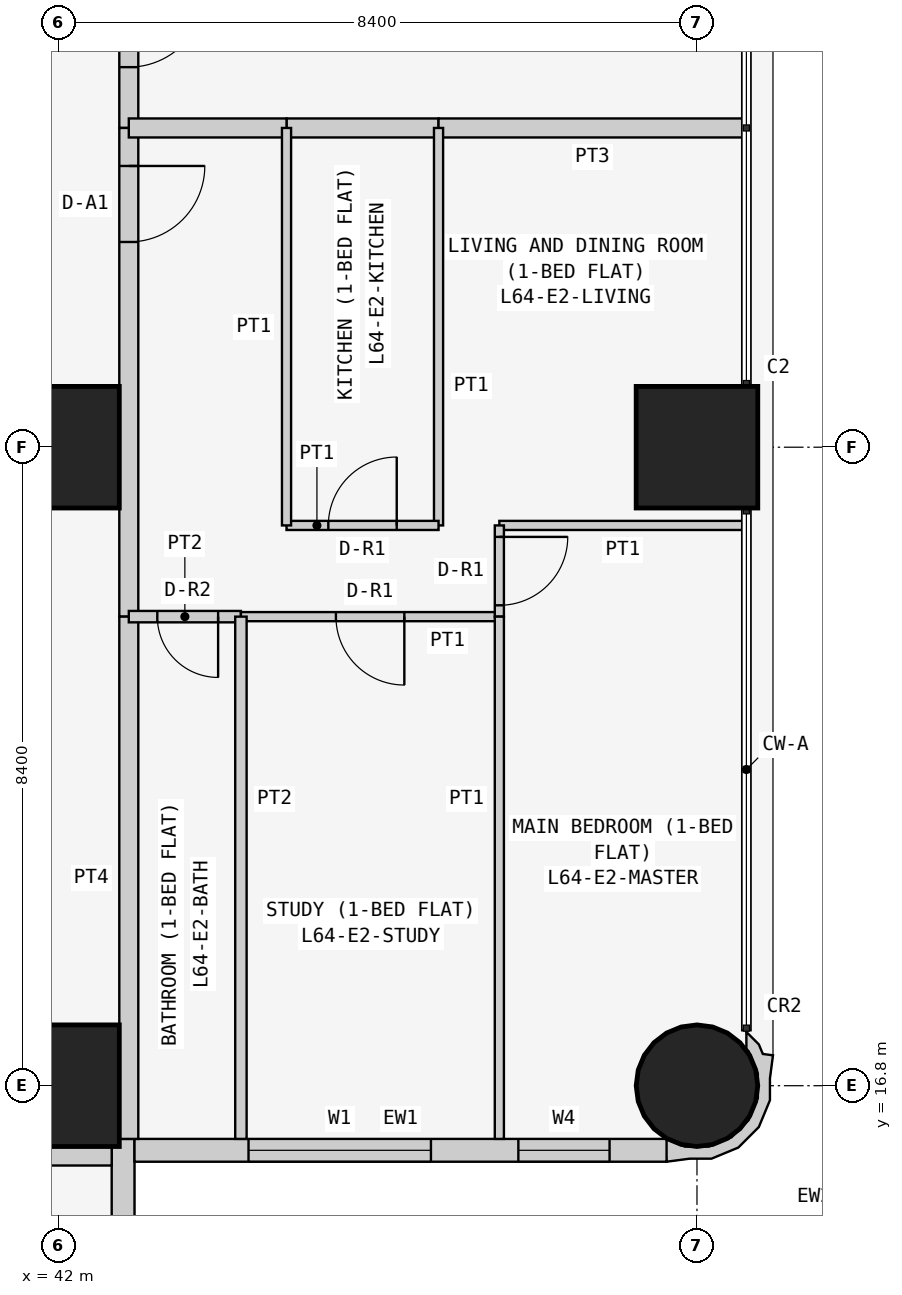
"""IFC4 building model, lengths in metres.
Left out: names, types, materials, properties, quantities, classifications, styles, units other than length and angle.
Written with IfcOpenShell. Run it as: python <this file> out.ifc"""

import sys

from ifc_helpers import new_model, si_unit, direction, frame, frame_2d, origin, origin_2d, place, context, subcontext, project, spatial, polyline, rectangle, circle, outline, extrude, element, fill, save


model = new_model("IFC4")
c1 = context("Model", 3, precision=1e-05, world=origin(), true_north=direction((0.0, 1.0)))
c2 = subcontext(c1, "Body", "Model", "MODEL_VIEW")
j1 = project(units=[si_unit("LENGTHUNIT", "METRE"), si_unit("PLANEANGLEUNIT", "RADIAN")], contexts=[c1])
p1 = place(None, origin())
s1 = spatial("IfcSite", under=j1, at=p1, CompositionType="ELEMENT")
p2 = place(p1, origin())
s2 = spatial("IfcBuilding", under=s1, at=p2, CompositionType="ELEMENT")
p3 = place(p2, frame((0.0, 0.0, 244.5)))
s3 = spatial("IfcBuildingStorey", under=s2, at=p3, CompositionType="ELEMENT", Elevation=244.5)
for number, where, z_axis, x_axis in (
    (1, (42.0, 16.8, 0.0), (0.0, 0.0, 1.0), (1.0, 0.0, 0.0)),
    (2, (42.0, 25.2, 0.0), (0.0, 0.0, 1.0), (1.0, 0.0, 0.0)),
):
    element("IfcColumn", number, at=place(p3, frame(where, z_axis=z_axis, x_axis=x_axis)), inside=s3, PredefinedType="COLUMN", context=c2, shape_type="SweptSolid", body=[
        extrude(rectangle(XDim=1.6, YDim=1.6, at=origin_2d()), origin(), (0.0, 0.0, 1.0), 3.6),
    ])
p4 = place(p3, frame((50.4, 16.8, 0.0), z_axis=(0.0, 0.0, 1.0), x_axis=(1.0, 0.0, 0.0)))
e3 = element("IfcColumn", 3, at=p4, inside=s3, PredefinedType="COLUMN", context=c2, shape_type="SweptSolid", body=[
    extrude(circle(Radius=0.8, at=origin_2d()), origin(), (0.0, 0.0, 1.0), 3.6),
])
p5 = place(p3, frame((50.4, 25.2, 0.0), z_axis=(0.0, 0.0, 1.0), x_axis=(1.0, 0.0, 0.0)))
e4 = element("IfcColumn", 4, at=p5, inside=s3, PredefinedType="COLUMN", context=c2, shape_type="SweptSolid", body=[
    extrude(rectangle(XDim=1.6, YDim=1.6, at=origin_2d()), origin(), (0.0, 0.0, 1.0), 3.6),
])
p6 = place(p3, frame((42.85, 8.8, 0.0), z_axis=(0.0, 0.0, 1.0), x_axis=(0.0, 1.0, 0.0)))
e5 = element("IfcWall", 5, at=p6, inside=s3, PredefinedType="SOLIDWALL", context=c2, shape_type="SweptSolid", body=[
    extrude(rectangle(XDim=7.3, YDim=0.3, at=frame_2d((3.65, 0.0))), origin(), (0.0, 0.0, 1.0), 3.35),
])
p7 = place(p6, frame((3.1, 0.0, 0.9)))
e6 = element("IfcOpeningElement", 6, at=p7, cuts=e5, PredefinedType="OPENING", context=c2, shape_type="SweptSolid", body=[
    extrude(rectangle(XDim=2.4, YDim=1.5, at=frame_2d((1.2, 0.75))), frame((0.0, 0.16, 0.0), z_axis=(0.0, -1.0, 0.0), x_axis=(1.0, 0.0, 0.0)), (0.0, 0.0, 1.0), 0.32),
])
p8 = place(p6, frame((0.75, 0.0, 0.9)))
e7 = element("IfcOpeningElement", 7, at=p8, cuts=e5, PredefinedType="OPENING", context=c2, shape_type="SweptSolid", body=[
    extrude(rectangle(XDim=1.2, YDim=1.5, at=frame_2d((0.6, 0.75))), frame((0.0, 0.16, 0.0), z_axis=(0.0, -1.0, 0.0), x_axis=(1.0, 0.0, 0.0)), (0.0, 0.0, 1.0), 0.32),
])
p9 = place(p3, frame((43.0, 15.95, 0.0), z_axis=(0.0, 0.0, 1.0), x_axis=(1.0, 0.0, 0.0)))
e8 = element("IfcWall", 8, at=p9, inside=s3, PredefinedType="SOLIDWALL", context=c2, shape_type="SweptSolid", body=[
    extrude(rectangle(XDim=7.0, YDim=0.3, at=frame_2d((3.5, 0.0))), origin(), (0.0, 0.0, 1.0), 3.35),
])
p10 = place(p9, frame((1.5, 0.0, 0.9)))
e9 = element("IfcOpeningElement", 9, at=p10, cuts=e8, PredefinedType="OPENING", context=c2, shape_type="SweptSolid", body=[
    extrude(rectangle(XDim=2.4, YDim=1.5, at=frame_2d((1.2, 0.75))), frame((0.0, 0.16, 0.0), z_axis=(0.0, -1.0, 0.0), x_axis=(1.0, 0.0, 0.0)), (0.0, 0.0, 1.0), 0.32),
])
p11 = place(p9, frame((5.05, 0.0, 0.9)))
e10 = element("IfcOpeningElement", 10, at=p11, cuts=e8, PredefinedType="OPENING", context=c2, shape_type="SweptSolid", body=[
    extrude(rectangle(XDim=1.2, YDim=1.5, at=frame_2d((0.6, 0.75))), frame((0.0, 0.16, 0.0), z_axis=(0.0, -1.0, 0.0), x_axis=(1.0, 0.0, 0.0)), (0.0, 0.0, 1.0), 0.32),
])
p12 = place(p3, frame((50.073, 15.983, 0.0), z_axis=(0.0, 0.0, 1.0), x_axis=(0.93923434088, -0.343276641956, 0.0)))
e11 = element("IfcWall", 11, at=p12, inside=s3, PredefinedType="SOLIDWALL", context=c2, shape_type="SweptSolid", body=[
    extrude(outline(polyline([(0.828, 1.598), (0.697, 1.569), (0.604, 1.67), (0.394, 1.767), (0.471, 1.556), (0.509, 1.539), (0.724, 1.304), (0.833, 1.005), (0.82, 0.686), (0.686, 0.397), (0.451, 0.182), (0.152, 0.073), (-0.116, 0.084), (-0.128, 0.078), (-0.146, 0.071), (-0.006, -0.197), (0.266, -0.055), (0.535, 0.044), (0.817, 0.302), (0.978, 0.648), (0.994, 1.03), (0.895, 1.3), (0.828, 1.598)])), origin(), (0.0, 0.0, 1.0), 3.35),
])
p13 = place(p3, frame((42.925, 32.0, 0.0), z_axis=(0.0, 0.0, 1.0), x_axis=(0.0, -1.0, 0.0)))
e12 = element("IfcWall", 12, at=p13, inside=s3, PredefinedType="PARTITIONING", context=c2, shape_type="SweptSolid", body=[
    extrude(rectangle(XDim=2.6, YDim=0.25, at=frame_2d((1.3, 0.0))), origin(), (0.0, 0.0, 1.0), 3.35),
])
p14 = place(p13, frame((0.8, 0.0, 0.0)))
e13 = element("IfcOpeningElement", 13, at=p14, cuts=e12, PredefinedType="OPENING", context=c2, shape_type="SweptSolid", body=[
    extrude(rectangle(XDim=1.0, YDim=2.1, at=frame_2d((0.5, 1.05))), frame((0.0, 0.135, 0.0), z_axis=(0.0, -1.0, 0.0), x_axis=(1.0, 0.0, 0.0)), (0.0, 0.0, 1.0), 0.27),
])
p15 = place(p3, frame((42.925, 29.4, 0.0), z_axis=(0.0, 0.0, 1.0), x_axis=(0.0, -1.0, 0.0)))
e14 = element("IfcWall", 14, at=p15, inside=s3, PredefinedType="PARTITIONING", context=c2, shape_type="SweptSolid", body=[
    extrude(rectangle(XDim=6.429, YDim=0.25, at=frame_2d((3.214, 0.0))), origin(), (0.0, 0.0, 1.0), 3.35),
])
p16 = place(p15, frame((0.5, 0.0, 0.0)))
e15 = element("IfcOpeningElement", 15, at=p16, cuts=e14, PredefinedType="OPENING", context=c2, shape_type="SweptSolid", body=[
    extrude(rectangle(XDim=1.0, YDim=2.1, at=frame_2d((0.5, 1.05))), frame((0.0, 0.135, 0.0), z_axis=(0.0, -1.0, 0.0), x_axis=(1.0, 0.0, 0.0)), (0.0, 0.0, 1.0), 0.27),
])
for number, where, z_axis, x_axis in (
    (16, (42.925, 22.971, 0.0), (0.0, 0.0, 1.0), (0.0, -1.0, 0.0)),
    (17, (42.7, 15.875, 0.0), (0.0, 0.0, 1.0), (-1.0, 0.0, 0.0)),
):
    element("IfcWall", number, at=place(p3, frame(where, z_axis=z_axis, x_axis=x_axis)), inside=s3, PredefinedType="PARTITIONING", context=c2, shape_type="SweptSolid", body=[
        extrude(rectangle(XDim=6.871, YDim=0.25, at=frame_2d((3.436, 0.0))), origin(), (0.0, 0.0, 1.0), 3.35),
    ])
p17 = place(p3, frame((47.0, 29.4, 0.0), z_axis=(0.0, 0.0, 1.0), x_axis=(-1.0, 0.0, 0.0)))
e18 = element("IfcWall", 18, at=p17, inside=s3, PredefinedType="PARTITIONING", context=c2, shape_type="SweptSolid", body=[
    extrude(rectangle(XDim=2.0, YDim=0.25, at=frame_2d((1.0, 0.0))), origin(), (0.0, 0.0, 1.0), 3.35),
])
p18 = place(p3, frame((45.0, 29.4, 0.0), z_axis=(0.0, 0.0, 1.0), x_axis=(-1.0, 0.0, 0.0)))
e19 = element("IfcWall", 19, at=p18, inside=s3, PredefinedType="PARTITIONING", context=c2, shape_type="SweptSolid", body=[
    extrude(rectangle(XDim=2.075, YDim=0.25, at=frame_2d((1.038, 0.0))), origin(), (0.0, 0.0, 1.0), 3.35),
])
p19 = place(p3, frame((51.05, 29.4, 0.0), z_axis=(0.0, 0.0, 1.0), x_axis=(-1.0, 0.0, 0.0)))
e20 = element("IfcWall", 20, at=p19, inside=s3, PredefinedType="PARTITIONING", context=c2, shape_type="SweptSolid", body=[
    extrude(rectangle(XDim=4.05, YDim=0.25, at=frame_2d((2.025, 0.0))), origin(), (0.0, 0.0, 1.0), 3.35),
])
p20 = place(p3, frame((47.0, 29.4, 0.0), z_axis=(0.0, 0.0, 1.0), x_axis=(0.0, -1.0, 0.0)))
e21 = element("IfcWall", 21, at=p20, inside=s3, PredefinedType="PARTITIONING", context=c2, shape_type="SweptSolid", body=[
    extrude(rectangle(XDim=5.229, YDim=0.12, at=frame_2d((2.615, 0.0))), origin(), (0.0, 0.0, 1.0), 3.35),
])
p21 = place(p3, frame((47.0, 24.171, 0.0), z_axis=(0.0, 0.0, 1.0), x_axis=(-1.0, 0.0, 0.0)))
e22 = element("IfcWall", 22, at=p21, inside=s3, PredefinedType="PARTITIONING", context=c2, shape_type="SweptSolid", body=[
    extrude(rectangle(XDim=2.0, YDim=0.12, at=frame_2d((1.0, 0.0))), origin(), (0.0, 0.0, 1.0), 3.35),
])
p22 = place(p21, frame((0.55, 0.0, 0.0)))
e23 = element("IfcOpeningElement", 23, at=p22, cuts=e22, PredefinedType="OPENING", context=c2, shape_type="SweptSolid", body=[
    extrude(rectangle(XDim=0.9, YDim=2.1, at=frame_2d((0.45, 1.05))), frame((0.0, 0.07, 0.0), z_axis=(0.0, -1.0, 0.0), x_axis=(1.0, 0.0, 0.0)), (0.0, 0.0, 1.0), 0.14),
])
p23 = place(p3, frame((45.0, 24.171, 0.0), z_axis=(0.0, 0.0, 1.0), x_axis=(0.0, 1.0, 0.0)))
e24 = element("IfcWall", 24, at=p23, inside=s3, PredefinedType="PARTITIONING", context=c2, shape_type="SweptSolid", body=[
    extrude(rectangle(XDim=5.229, YDim=0.12, at=frame_2d((2.615, 0.0))), origin(), (0.0, 0.0, 1.0), 3.35),
])
p24 = place(p3, frame((44.4, 22.971, 0.0), z_axis=(0.0, 0.0, 1.0), x_axis=(-1.0, 0.0, 0.0)))
e25 = element("IfcWall", 25, at=p24, inside=s3, PredefinedType="PARTITIONING", context=c2, shape_type="SweptSolid", body=[
    extrude(rectangle(XDim=1.475, YDim=0.15, at=frame_2d((0.737, 0.0))), origin(), (0.0, 0.0, 1.0), 3.35),
])
p25 = place(p24, frame((0.3, 0.0, 0.0)))
e26 = element("IfcOpeningElement", 26, at=p25, cuts=e25, PredefinedType="OPENING", context=c2, shape_type="SweptSolid", body=[
    extrude(rectangle(XDim=0.8, YDim=2.1, at=frame_2d((0.4, 1.05))), frame((0.0, 0.085, 0.0), z_axis=(0.0, -1.0, 0.0), x_axis=(1.0, 0.0, 0.0)), (0.0, 0.0, 1.0), 0.17),
])
p26 = place(p3, frame((47.8, 22.971, 0.0), z_axis=(0.0, 0.0, 1.0), x_axis=(-1.0, 0.0, 0.0)))
e27 = element("IfcWall", 27, at=p26, inside=s3, PredefinedType="PARTITIONING", context=c2, shape_type="SweptSolid", body=[
    extrude(rectangle(XDim=3.4, YDim=0.12, at=frame_2d((1.7, 0.0))), origin(), (0.0, 0.0, 1.0), 3.35),
])
p27 = place(p26, frame((1.25, 0.0, 0.0)))
e28 = element("IfcOpeningElement", 28, at=p27, cuts=e27, PredefinedType="OPENING", context=c2, shape_type="SweptSolid", body=[
    extrude(rectangle(XDim=0.9, YDim=2.1, at=frame_2d((0.45, 1.05))), frame((0.0, 0.07, 0.0), z_axis=(0.0, -1.0, 0.0), x_axis=(1.0, 0.0, 0.0)), (0.0, 0.0, 1.0), 0.14),
])
p28 = place(p3, frame((51.05, 24.171, 0.0), z_axis=(0.0, 0.0, 1.0), x_axis=(-1.0, 0.0, 0.0)))
e29 = element("IfcWall", 29, at=p28, inside=s3, PredefinedType="PARTITIONING", context=c2, shape_type="SweptSolid", body=[
    extrude(rectangle(XDim=3.25, YDim=0.12, at=frame_2d((1.625, 0.0))), origin(), (0.0, 0.0, 1.0), 3.35),
])
p29 = place(p3, frame((47.8, 24.171, 0.0), z_axis=(0.0, 0.0, 1.0), x_axis=(0.0, -1.0, 0.0)))
e30 = element("IfcWall", 30, at=p29, inside=s3, PredefinedType="PARTITIONING", context=c2, shape_type="SweptSolid", body=[
    extrude(rectangle(XDim=1.2, YDim=0.12, at=frame_2d((0.6, 0.0))), origin(), (0.0, 0.0, 1.0), 3.35),
])
p30 = place(p29, frame((0.151, 0.0, 0.0)))
e31 = element("IfcOpeningElement", 31, at=p30, cuts=e30, PredefinedType="OPENING", context=c2, shape_type="SweptSolid", body=[
    extrude(rectangle(XDim=0.9, YDim=2.1, at=frame_2d((0.45, 1.05))), frame((0.0, 0.07, 0.0), z_axis=(0.0, -1.0, 0.0), x_axis=(1.0, 0.0, 0.0)), (0.0, 0.0, 1.0), 0.14),
])
p31 = place(p3, frame((44.4, 22.971, 0.0), z_axis=(0.0, 0.0, 1.0), x_axis=(0.0, -1.0, 0.0)))
e32 = element("IfcWall", 32, at=p31, inside=s3, PredefinedType="PARTITIONING", context=c2, shape_type="SweptSolid", body=[
    extrude(rectangle(XDim=6.871, YDim=0.15, at=frame_2d((3.436, 0.0))), origin(), (0.0, 0.0, 1.0), 3.35),
])
p32 = place(p3, frame((47.8, 22.971, 0.0), z_axis=(0.0, 0.0, 1.0), x_axis=(0.0, -1.0, 0.0)))
e33 = element("IfcWall", 33, at=p32, inside=s3, PredefinedType="PARTITIONING", context=c2, shape_type="SweptSolid", body=[
    extrude(rectangle(XDim=6.871, YDim=0.12, at=frame_2d((3.436, 0.0))), origin(), (0.0, 0.0, 1.0), 3.35),
])
p33 = place(p10, origin())
e34 = element("IfcWindow", 34, at=p33, inside=s3, PartitioningType="SINGLE_PANEL", PredefinedType="WINDOW", context=c2, shape_type="SweptSolid", body=[
    extrude(rectangle(XDim=2.4, YDim=1.5, at=frame_2d((1.2, 0.75))), frame((0.0, 0.03, 0.0), z_axis=(0.0, -1.0, 0.0), x_axis=(1.0, 0.0, 0.0)), (0.0, 0.0, 1.0), 0.06),
])
fill(e9, e34)
p34 = place(p11, origin())
e35 = element("IfcWindow", 35, at=p34, inside=s3, PartitioningType="SINGLE_PANEL", PredefinedType="WINDOW", context=c2, shape_type="SweptSolid", body=[
    extrude(rectangle(XDim=1.2, YDim=1.5, at=frame_2d((0.6, 0.75))), frame((0.0, 0.03, 0.0), z_axis=(0.0, -1.0, 0.0), x_axis=(1.0, 0.0, 0.0)), (0.0, 0.0, 1.0), 0.06),
])
fill(e10, e35)
p35 = place(p14, origin())
e36 = element("IfcDoor", 36, at=p35, inside=s3, OperationType="SINGLE_SWING_LEFT", PredefinedType="DOOR", context=c2, shape_type="SweptSolid", body=[
    extrude(rectangle(XDim=1.0, YDim=2.1, at=frame_2d((0.5, 1.05))), frame((0.0, 0.025, 0.0), z_axis=(0.0, -1.0, 0.0), x_axis=(1.0, 0.0, 0.0)), (0.0, 0.0, 1.0), 0.05),
])
fill(e13, e36)
p36 = place(p16, origin())
e37 = element("IfcDoor", 37, at=p36, inside=s3, OperationType="SINGLE_SWING_LEFT", PredefinedType="DOOR", context=c2, shape_type="SweptSolid", body=[
    extrude(rectangle(XDim=1.0, YDim=2.1, at=frame_2d((0.5, 1.05))), frame((0.0, 0.025, 0.0), z_axis=(0.0, -1.0, 0.0), x_axis=(1.0, 0.0, 0.0)), (0.0, 0.0, 1.0), 0.05),
])
fill(e15, e37)
p37 = place(p22, frame((0.9, 0.0, 0.0), z_axis=(0.0, 0.0, 1.0), x_axis=(-1.0, 0.0, 0.0)))
e38 = element("IfcDoor", 38, at=p37, inside=s3, OperationType="SINGLE_SWING_RIGHT", PredefinedType="DOOR", context=c2, shape_type="SweptSolid", body=[
    extrude(rectangle(XDim=0.9, YDim=2.1, at=frame_2d((0.45, 1.05))), frame((0.0, 0.025, 0.0), z_axis=(0.0, -1.0, 0.0), x_axis=(1.0, 0.0, 0.0)), (0.0, 0.0, 1.0), 0.05),
])
fill(e23, e38)
p38 = place(p25, origin())
e39 = element("IfcDoor", 39, at=p38, inside=s3, OperationType="SINGLE_SWING_LEFT", PredefinedType="DOOR", context=c2, shape_type="SweptSolid", body=[
    extrude(rectangle(XDim=0.8, YDim=2.1, at=frame_2d((0.4, 1.05))), frame((0.0, 0.025, 0.0), z_axis=(0.0, -1.0, 0.0), x_axis=(1.0, 0.0, 0.0)), (0.0, 0.0, 1.0), 0.05),
])
fill(e26, e39)
p39 = place(p27, origin())
e40 = element("IfcDoor", 40, at=p39, inside=s3, OperationType="SINGLE_SWING_LEFT", PredefinedType="DOOR", context=c2, shape_type="SweptSolid", body=[
    extrude(rectangle(XDim=0.9, YDim=2.1, at=frame_2d((0.45, 1.05))), frame((0.0, 0.025, 0.0), z_axis=(0.0, -1.0, 0.0), x_axis=(1.0, 0.0, 0.0)), (0.0, 0.0, 1.0), 0.05),
])
fill(e28, e40)
p40 = place(p30, origin())
e41 = element("IfcDoor", 41, at=p40, inside=s3, OperationType="SINGLE_SWING_LEFT", PredefinedType="DOOR", context=c2, shape_type="SweptSolid", body=[
    extrude(rectangle(XDim=0.9, YDim=2.1, at=frame_2d((0.45, 1.05))), frame((0.0, 0.025, 0.0), z_axis=(0.0, -1.0, 0.0), x_axis=(1.0, 0.0, 0.0)), (0.0, 0.0, 1.0), 0.05),
])
fill(e31, e41)
save(model, sys.argv[1])
